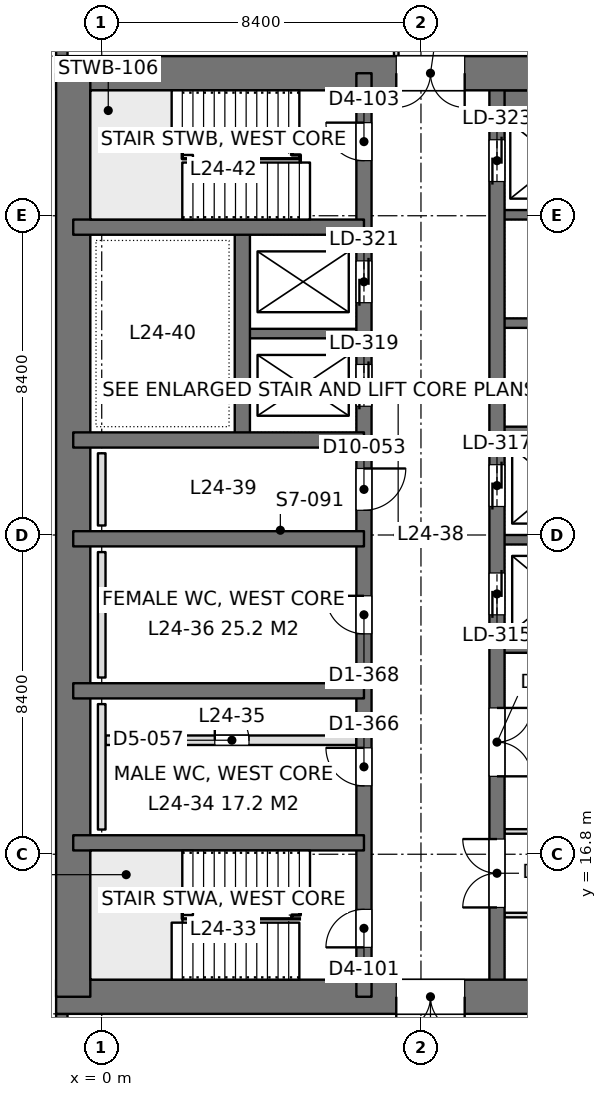
"""IFC4 building model, lengths in metres.
Left out: names, types, materials, properties, quantities, classifications, styles, units other than length and angle.
Written with IfcOpenShell. Run it as: python <this file> out.ifc"""

import sys

from ifc_helpers import new_model, si_unit, direction, frame, frame_2d, origin, place, context, subcontext, project, spatial, rectangle, extrude, element, fill, save


model = new_model("IFC4")
c1 = context("Model", 3, precision=1e-05, world=origin(), true_north=direction((0.0, 1.0)))
c2 = subcontext(c1, "Body", "Model", "MODEL_VIEW")
j1 = project(units=[si_unit("LENGTHUNIT", "METRE"), si_unit("PLANEANGLEUNIT", "RADIAN")], contexts=[c1])
p1 = place(None, origin())
s1 = spatial("IfcSite", under=j1, at=p1, CompositionType="ELEMENT")
p2 = place(p1, origin())
s2 = spatial("IfcBuilding", under=s1, at=p2, CompositionType="ELEMENT")
p3 = place(p2, frame((0.0, 0.0, 109.2)))
s3 = spatial("IfcBuildingStorey", under=s2, at=p3, CompositionType="ELEMENT", Elevation=109.2)
p4 = place(p3, frame((-1.2, 13.05, 0.0), z_axis=(0.0, 0.0, 1.0), x_axis=(1.0, 0.0, 0.0)))
e1 = element("IfcWall", 1, at=p4, inside=s3, PredefinedType="SHEAR", context=c2, shape_type="SweptSolid", body=[
    extrude(rectangle(XDim=18.0, YDim=0.9, at=frame_2d((9.0, 0.0))), origin(), (0.0, 0.0, 1.0), 4.2),
])
p5 = place(p4, frame((8.95, 0.0, 0.0)))
e2 = element("IfcOpeningElement", 2, at=p5, cuts=e1, PredefinedType="OPENING", context=c2, shape_type="SweptSolid", body=[
    extrude(rectangle(XDim=1.8, YDim=2.4, at=frame_2d((0.9, 1.2))), frame((0.0, 0.46, 0.0), z_axis=(0.0, -1.0, 0.0), x_axis=(1.0, 0.0, 0.0)), (0.0, 0.0, 1.0), 0.92),
])
p6 = place(p3, frame((-1.2, 37.35, 0.0), z_axis=(0.0, 0.0, 1.0), x_axis=(1.0, 0.0, 0.0)))
e3 = element("IfcWall", 3, at=p6, inside=s3, PredefinedType="SHEAR", context=c2, shape_type="SweptSolid", body=[
    extrude(rectangle(XDim=18.0, YDim=0.9, at=frame_2d((9.0, 0.0))), origin(), (0.0, 0.0, 1.0), 4.2),
])
p7 = place(p6, frame((8.95, 0.0, 0.0)))
e4 = element("IfcOpeningElement", 4, at=p7, cuts=e3, PredefinedType="OPENING", context=c2, shape_type="SweptSolid", body=[
    extrude(rectangle(XDim=1.8, YDim=2.4, at=frame_2d((0.9, 1.2))), frame((0.0, 0.46, 0.0), z_axis=(0.0, -1.0, 0.0), x_axis=(1.0, 0.0, 0.0)), (0.0, 0.0, 1.0), 0.92),
])
p8 = place(p3, frame((-0.75, 13.05, 0.0), z_axis=(0.0, 0.0, 1.0), x_axis=(0.0, 1.0, 0.0)))
e5 = element("IfcWall", 5, at=p8, inside=s3, PredefinedType="SHEAR", context=c2, shape_type="SweptSolid", body=[
    extrude(rectangle(XDim=24.3, YDim=0.9, at=frame_2d((12.15, 0.0))), origin(), (0.0, 0.0, 1.0), 4.2),
])
p9 = place(p3, frame((6.9, 13.05, 0.0), z_axis=(0.0, 0.0, 1.0), x_axis=(0.0, 1.0, 0.0)))
e6 = element("IfcWall", 6, at=p9, inside=s3, PredefinedType="SHEAR", context=c2, shape_type="SweptSolid", body=[
    extrude(rectangle(XDim=24.3, YDim=0.4, at=frame_2d((12.15, 0.0))), origin(), (0.0, 0.0, 1.0), 4.2),
])
p10 = place(p9, frame((1.3, 0.0, 0.0)))
e7 = element("IfcOpeningElement", 7, at=p10, cuts=e6, PredefinedType="OPENING", context=c2, shape_type="SweptSolid", body=[
    extrude(rectangle(XDim=1.0, YDim=2.2, at=frame_2d((0.5, 1.1))), frame((0.0, 0.21, 0.0), z_axis=(0.0, -1.0, 0.0), x_axis=(1.0, 0.0, 0.0)), (0.0, 0.0, 1.0), 0.42),
])
p11 = place(p9, frame((22.0, 0.0, 0.0)))
e8 = element("IfcOpeningElement", 8, at=p11, cuts=e6, PredefinedType="OPENING", context=c2, shape_type="SweptSolid", body=[
    extrude(rectangle(XDim=1.0, YDim=2.2, at=frame_2d((0.5, 1.1))), frame((0.0, 0.21, 0.0), z_axis=(0.0, -1.0, 0.0), x_axis=(1.0, 0.0, 0.0)), (0.0, 0.0, 1.0), 0.42),
])
p12 = place(p9, frame((5.55, 0.0, 0.0)))
e9 = element("IfcOpeningElement", 9, at=p12, cuts=e6, PredefinedType="OPENING", context=c2, shape_type="SweptSolid", body=[
    extrude(rectangle(XDim=1.0, YDim=2.2, at=frame_2d((0.5, 1.1))), frame((0.0, 0.21, 0.0), z_axis=(0.0, -1.0, 0.0), x_axis=(1.0, 0.0, 0.0)), (0.0, 0.0, 1.0), 0.42),
])
p13 = place(p9, frame((9.55, 0.0, 0.0)))
e10 = element("IfcOpeningElement", 10, at=p13, cuts=e6, PredefinedType="OPENING", context=c2, shape_type="SweptSolid", body=[
    extrude(rectangle(XDim=1.0, YDim=2.2, at=frame_2d((0.5, 1.1))), frame((0.0, 0.21, 0.0), z_axis=(0.0, -1.0, 0.0), x_axis=(1.0, 0.0, 0.0)), (0.0, 0.0, 1.0), 0.42),
])
p14 = place(p9, frame((12.8, 0.0, 0.0)))
e11 = element("IfcOpeningElement", 11, at=p14, cuts=e6, PredefinedType="OPENING", context=c2, shape_type="SweptSolid", body=[
    extrude(rectangle(XDim=1.1, YDim=2.2, at=frame_2d((0.55, 1.1))), frame((0.0, 0.21, 0.0), z_axis=(0.0, -1.0, 0.0), x_axis=(1.0, 0.0, 0.0)), (0.0, 0.0, 1.0), 0.42),
])
p15 = place(p9, frame((15.538, 0.0, 0.0)))
e12 = element("IfcOpeningElement", 12, at=p15, cuts=e6, PredefinedType="OPENING", context=c2, shape_type="SweptSolid", body=[
    extrude(rectangle(XDim=1.1, YDim=2.2, at=frame_2d((0.55, 1.1))), frame((0.0, 0.21, 0.0), z_axis=(0.0, -1.0, 0.0), x_axis=(1.0, 0.0, 0.0)), (0.0, 0.0, 1.0), 0.42),
])
p16 = place(p9, frame((18.262, 0.0, 0.0)))
e13 = element("IfcOpeningElement", 13, at=p16, cuts=e6, PredefinedType="OPENING", context=c2, shape_type="SweptSolid", body=[
    extrude(rectangle(XDim=1.1, YDim=2.2, at=frame_2d((0.55, 1.1))), frame((0.0, 0.21, 0.0), z_axis=(0.0, -1.0, 0.0), x_axis=(1.0, 0.0, 0.0)), (0.0, 0.0, 1.0), 0.42),
])
p17 = place(p3, frame((10.4, 13.05, 0.0), z_axis=(0.0, 0.0, 1.0), x_axis=(0.0, 1.0, 0.0)))
e14 = element("IfcWall", 14, at=p17, inside=s3, PredefinedType="SHEAR", context=c2, shape_type="SweptSolid", body=[
    extrude(rectangle(XDim=24.3, YDim=0.4, at=frame_2d((12.15, 0.0))), origin(), (0.0, 0.0, 1.0), 4.2),
])
p18 = place(p17, frame((10.05, 0.0, 0.0)))
e15 = element("IfcOpeningElement", 15, at=p18, cuts=e14, PredefinedType="OPENING", context=c2, shape_type="SweptSolid", body=[
    extrude(rectangle(XDim=1.1, YDim=2.2, at=frame_2d((0.55, 1.1))), frame((0.0, 0.21, 0.0), z_axis=(0.0, -1.0, 0.0), x_axis=(1.0, 0.0, 0.0)), (0.0, 0.0, 1.0), 0.42),
])
p19 = place(p17, frame((12.9, 0.0, 0.0)))
e16 = element("IfcOpeningElement", 16, at=p19, cuts=e14, PredefinedType="OPENING", context=c2, shape_type="SweptSolid", body=[
    extrude(rectangle(XDim=1.1, YDim=2.2, at=frame_2d((0.55, 1.1))), frame((0.0, 0.21, 0.0), z_axis=(0.0, -1.0, 0.0), x_axis=(1.0, 0.0, 0.0)), (0.0, 0.0, 1.0), 0.42),
])
p20 = place(p17, frame((21.45, 0.0, 0.0)))
e17 = element("IfcOpeningElement", 17, at=p20, cuts=e14, PredefinedType="OPENING", context=c2, shape_type="SweptSolid", body=[
    extrude(rectangle(XDim=1.1, YDim=2.2, at=frame_2d((0.55, 1.1))), frame((0.0, 0.21, 0.0), z_axis=(0.0, -1.0, 0.0), x_axis=(1.0, 0.0, 0.0)), (0.0, 0.0, 1.0), 0.42),
])
p21 = place(p17, frame((2.35, 0.0, 0.0)))
e18 = element("IfcOpeningElement", 18, at=p21, cuts=e14, PredefinedType="OPENING", context=c2, shape_type="SweptSolid", body=[
    extrude(rectangle(XDim=1.8, YDim=2.4, at=frame_2d((0.9, 1.2))), frame((0.0, 0.21, 0.0), z_axis=(0.0, -1.0, 0.0), x_axis=(1.0, 0.0, 0.0)), (0.0, 0.0, 1.0), 0.42),
])
p22 = place(p17, frame((5.8, 0.0, 0.0)))
e19 = element("IfcOpeningElement", 19, at=p22, cuts=e14, PredefinedType="OPENING", context=c2, shape_type="SweptSolid", body=[
    extrude(rectangle(XDim=1.8, YDim=2.4, at=frame_2d((0.9, 1.2))), frame((0.0, 0.21, 0.0), z_axis=(0.0, -1.0, 0.0), x_axis=(1.0, 0.0, 0.0)), (0.0, 0.0, 1.0), 0.42),
])
for number, where, z_axis, x_axis in (
    (20, (-0.75, 17.1, 0.0), (0.0, 0.0, 1.0), (1.0, 0.0, 0.0)),
    (21, (-0.75, 21.1, 0.0), (0.0, 0.0, 1.0), (1.0, 0.0, 0.0)),
    (22, (-0.75, 25.1, 0.0), (0.0, 0.0, 1.0), (1.0, 0.0, 0.0)),
    (23, (-0.75, 27.7, 0.0), (0.0, 0.0, 1.0), (1.0, 0.0, 0.0)),
    (24, (-0.75, 33.3, 0.0), (0.0, 0.0, 1.0), (1.0, 0.0, 0.0)),
):
    element("IfcWall", number, at=place(p3, frame(where, z_axis=z_axis, x_axis=x_axis)), inside=s3, PredefinedType="SHEAR", context=c2, shape_type="SweptSolid", body=[
        extrude(rectangle(XDim=7.65, YDim=0.4, at=frame_2d((3.825, 0.0))), origin(), (0.0, 0.0, 1.0), 4.2),
    ])
p23 = place(p3, frame((3.7, 27.7, 0.0), z_axis=(0.0, 0.0, 1.0), x_axis=(0.0, 1.0, 0.0)))
e25 = element("IfcWall", 25, at=p23, inside=s3, PredefinedType="SHEAR", context=c2, shape_type="SweptSolid", body=[
    extrude(rectangle(XDim=5.6, YDim=0.4, at=frame_2d((2.8, 0.0))), origin(), (0.0, 0.0, 1.0), 4.2),
])
p24 = place(p3, frame((3.7, 30.5, 0.0), z_axis=(0.0, 0.0, 1.0), x_axis=(1.0, 0.0, 0.0)))
e26 = element("IfcWall", 26, at=p24, inside=s3, PredefinedType="SHEAR", context=c2, shape_type="SweptSolid", body=[
    extrude(rectangle(XDim=3.2, YDim=0.25, at=frame_2d((1.6, 0.0))), origin(), (0.0, 0.0, 1.0), 4.2),
])
p25 = place(p3, frame((10.4, 22.225, 0.0), z_axis=(0.0, 0.0, 1.0), x_axis=(1.0, 0.0, 0.0)))
e27 = element("IfcWall", 27, at=p25, inside=s3, PredefinedType="SHEAR", context=c2, shape_type="SweptSolid", body=[
    extrude(rectangle(XDim=5.95, YDim=0.25, at=frame_2d((2.975, 0.0))), origin(), (0.0, 0.0, 1.0), 4.2),
])
for number, where, z_axis, x_axis in (
    (28, (10.4, 25.075, 0.0), (0.0, 0.0, 1.0), (1.0, 0.0, 0.0)),
    (29, (10.4, 27.925, 0.0), (0.0, 0.0, 1.0), (1.0, 0.0, 0.0)),
    (30, (10.4, 30.775, 0.0), (0.0, 0.0, 1.0), (1.0, 0.0, 0.0)),
    (31, (10.4, 33.625, 0.0), (0.0, 0.0, 1.0), (1.0, 0.0, 0.0)),
):
    element("IfcWall", number, at=place(p3, frame(where, z_axis=z_axis, x_axis=x_axis)), inside=s3, PredefinedType="SHEAR", context=c2, shape_type="SweptSolid", body=[
        extrude(rectangle(XDim=3.2, YDim=0.25, at=frame_2d((1.6, 0.0))), origin(), (0.0, 0.0, 1.0), 4.2),
    ])
p26 = place(p3, frame((10.4, 36.625, 0.0), z_axis=(0.0, 0.0, 1.0), x_axis=(1.0, 0.0, 0.0)))
e32 = element("IfcWall", 32, at=p26, inside=s3, PredefinedType="SHEAR", context=c2, shape_type="SweptSolid", body=[
    extrude(rectangle(XDim=3.2, YDim=0.55, at=frame_2d((1.6, 0.0))), origin(), (0.0, 0.0, 1.0), 4.2),
])
p27 = place(p3, frame((-1.05, 8.4, 0.0), z_axis=(0.0, 0.0, 1.0), x_axis=(0.0, 1.0, 0.0)))
e33 = element("IfcWall", 33, at=p27, inside=s3, PredefinedType="SOLIDWALL", context=c2, shape_type="SweptSolid", body=[
    extrude(rectangle(XDim=4.2, YDim=0.3, at=frame_2d((2.1, 0.0))), origin(), (0.0, 0.0, 1.0), 4.05),
])
p28 = place(p27, frame((0.9, 0.0, 0.9)))
e34 = element("IfcOpeningElement", 34, at=p28, cuts=e33, PredefinedType="OPENING", context=c2, shape_type="SweptSolid", body=[
    extrude(rectangle(XDim=2.4, YDim=1.9, at=frame_2d((1.2, 0.95))), frame((0.0, 0.16, 0.0), z_axis=(0.0, -1.0, 0.0), x_axis=(1.0, 0.0, 0.0)), (0.0, 0.0, 1.0), 0.32),
])
p29 = place(p3, frame((-1.05, 37.8, 0.0), z_axis=(0.0, 0.0, 1.0), x_axis=(0.0, 1.0, 0.0)))
e35 = element("IfcWall", 35, at=p29, inside=s3, PredefinedType="SOLIDWALL", context=c2, shape_type="SweptSolid", body=[
    extrude(rectangle(XDim=4.2, YDim=0.3, at=frame_2d((2.1, 0.0))), origin(), (0.0, 0.0, 1.0), 4.05),
])
p30 = place(p29, frame((0.9, 0.0, 0.9)))
e36 = element("IfcOpeningElement", 36, at=p30, cuts=e35, PredefinedType="OPENING", context=c2, shape_type="SweptSolid", body=[
    extrude(rectangle(XDim=2.4, YDim=1.9, at=frame_2d((1.2, 0.95))), frame((0.0, 0.16, 0.0), z_axis=(0.0, -1.0, 0.0), x_axis=(1.0, 0.0, 0.0)), (0.0, 0.0, 1.0), 0.32),
])
p31 = place(p3, frame((10.598, 17.4, 0.0), z_axis=(0.0, 0.0, 1.0), x_axis=(1.0, 0.0, 0.0)))
e37 = element("IfcWall", 37, at=p31, inside=s3, PredefinedType="PARTITIONING", context=c2, shape_type="SweptSolid", body=[
    extrude(rectangle(XDim=5.904, YDim=0.12, at=frame_2d((2.952, 0.0))), origin(), (0.0, 0.0, 1.0), 3.55),
])
p32 = place(p31, frame((4.524, 0.0, 0.0)))
e38 = element("IfcOpeningElement", 38, at=p32, cuts=e37, PredefinedType="OPENING", context=c2, shape_type="SweptSolid", body=[
    extrude(rectangle(XDim=1.0, YDim=2.4, at=frame_2d((0.5, 1.2))), frame((0.0, 0.07, 0.0), z_axis=(0.0, -1.0, 0.0), x_axis=(1.0, 0.0, 0.0)), (0.0, 0.0, 1.0), 0.14),
])
p33 = place(p3, frame((10.598, 15.2, 0.0), z_axis=(0.0, 0.0, 1.0), x_axis=(1.0, 0.0, 0.0)))
e39 = element("IfcWall", 39, at=p33, inside=s3, PredefinedType="PARTITIONING", context=c2, shape_type="SweptSolid", body=[
    extrude(rectangle(XDim=6.204, YDim=0.12, at=frame_2d((3.102, 0.0))), origin(), (0.0, 0.0, 1.0), 3.55),
])
p34 = place(p3, frame((7.75, 37.8, 0.0), z_axis=(0.0, 0.0, 1.0), x_axis=(0.0, 1.0, 0.0)))
e40 = element("IfcWall", 40, at=p34, inside=s3, PredefinedType="PARTITIONING", context=c2, shape_type="SweptSolid", body=[
    extrude(rectangle(XDim=2.0, YDim=0.12, at=frame_2d((1.0, 0.0))), origin(), (0.0, 0.0, 1.0), 4.05),
])
p35 = place(p3, frame((0.1, 19.8, 0.0), z_axis=(0.0, 0.0, 1.0), x_axis=(1.0, 0.0, 0.0)))
e41 = element("IfcWall", 41, at=p35, inside=s3, PredefinedType="PARTITIONING", context=c2, shape_type="SweptSolid", body=[
    extrude(rectangle(XDim=6.6, YDim=0.25, at=frame_2d((3.3, 0.0))), origin(), (0.0, 0.0, 1.0), 4.0),
])
p36 = place(p35, frame((2.875, 0.0, 0.0)))
e42 = element("IfcOpeningElement", 42, at=p36, cuts=e41, PredefinedType="OPENING", context=c2, shape_type="SweptSolid", body=[
    extrude(rectangle(XDim=0.9, YDim=2.2, at=frame_2d((0.45, 1.1))), frame((0.0, 0.135, 0.0), z_axis=(0.0, -1.0, 0.0), x_axis=(1.0, 0.0, 0.0)), (0.0, 0.0, 1.0), 0.27),
])
for number, where, z_axis, x_axis in (
    (43, (0.0, 17.45, 0.0), (0.0, 0.0, 1.0), (0.0, 1.0, 0.0)),
    (44, (0.0, 21.45, 0.0), (0.0, 0.0, 1.0), (0.0, 1.0, 0.0)),
):
    element("IfcWall", number, at=place(p3, frame(where, z_axis=z_axis, x_axis=x_axis)), inside=s3, PredefinedType="PLUMBINGWALL", context=c2, shape_type="SweptSolid", body=[
        extrude(rectangle(XDim=3.3, YDim=0.2, at=frame_2d((1.65, 0.0))), origin(), (0.0, 0.0, 1.0), 1.2),
    ])
p37 = place(p3, frame((0.0, 25.45, 0.0), z_axis=(0.0, 0.0, 1.0), x_axis=(0.0, 1.0, 0.0)))
e45 = element("IfcWall", 45, at=p37, inside=s3, PredefinedType="PLUMBINGWALL", context=c2, shape_type="SweptSolid", body=[
    extrude(rectangle(XDim=1.9, YDim=0.2, at=frame_2d((0.95, 0.0))), origin(), (0.0, 0.0, 1.0), 1.2),
])
p38 = place(p5, frame((1.8, 0.0, 0.0), z_axis=(0.0, 0.0, 1.0), x_axis=(-1.0, 0.0, 0.0)))
e46 = element("IfcDoor", 46, at=p38, inside=s3, OperationType="DOUBLE_DOOR_SINGLE_SWING", PredefinedType="DOOR", context=c2, shape_type="SweptSolid", body=[
    extrude(rectangle(XDim=1.8, YDim=2.4, at=frame_2d((0.9, 1.2))), frame((0.0, 0.025, 0.0), z_axis=(0.0, -1.0, 0.0), x_axis=(1.0, 0.0, 0.0)), (0.0, 0.0, 1.0), 0.05),
])
fill(e2, e46)
p39 = place(p7, frame((1.8, 0.0, 0.0), z_axis=(0.0, 0.0, 1.0), x_axis=(-1.0, 0.0, 0.0)))
e47 = element("IfcDoor", 47, at=p39, inside=s3, OperationType="DOUBLE_DOOR_SINGLE_SWING", PredefinedType="DOOR", context=c2, shape_type="SweptSolid", body=[
    extrude(rectangle(XDim=1.8, YDim=2.4, at=frame_2d((0.9, 1.2))), frame((0.0, 0.025, 0.0), z_axis=(0.0, -1.0, 0.0), x_axis=(1.0, 0.0, 0.0)), (0.0, 0.0, 1.0), 0.05),
])
fill(e4, e47)
p40 = place(p10, origin())
e48 = element("IfcDoor", 48, at=p40, inside=s3, OperationType="SINGLE_SWING_LEFT", PredefinedType="DOOR", context=c2, shape_type="SweptSolid", body=[
    extrude(rectangle(XDim=1.0, YDim=2.2, at=frame_2d((0.5, 1.1))), frame((0.0, 0.025, 0.0), z_axis=(0.0, -1.0, 0.0), x_axis=(1.0, 0.0, 0.0)), (0.0, 0.0, 1.0), 0.05),
])
fill(e7, e48)
p41 = place(p11, origin())
e49 = element("IfcDoor", 49, at=p41, inside=s3, OperationType="SINGLE_SWING_RIGHT", PredefinedType="DOOR", context=c2, shape_type="SweptSolid", body=[
    extrude(rectangle(XDim=1.0, YDim=2.2, at=frame_2d((0.5, 1.1))), frame((0.0, 0.025, 0.0), z_axis=(0.0, -1.0, 0.0), x_axis=(1.0, 0.0, 0.0)), (0.0, 0.0, 1.0), 0.05),
])
fill(e8, e49)
p42 = place(p12, origin())
e50 = element("IfcDoor", 50, at=p42, inside=s3, OperationType="SINGLE_SWING_RIGHT", PredefinedType="DOOR", context=c2, shape_type="SweptSolid", body=[
    extrude(rectangle(XDim=1.0, YDim=2.2, at=frame_2d((0.5, 1.1))), frame((0.0, 0.025, 0.0), z_axis=(0.0, -1.0, 0.0), x_axis=(1.0, 0.0, 0.0)), (0.0, 0.0, 1.0), 0.05),
])
fill(e9, e50)
p43 = place(p13, origin())
e51 = element("IfcDoor", 51, at=p43, inside=s3, OperationType="SINGLE_SWING_RIGHT", PredefinedType="DOOR", context=c2, shape_type="SweptSolid", body=[
    extrude(rectangle(XDim=1.0, YDim=2.2, at=frame_2d((0.5, 1.1))), frame((0.0, 0.025, 0.0), z_axis=(0.0, -1.0, 0.0), x_axis=(1.0, 0.0, 0.0)), (0.0, 0.0, 1.0), 0.05),
])
fill(e10, e51)
p44 = place(p14, frame((1.1, 0.0, 0.0), z_axis=(0.0, 0.0, 1.0), x_axis=(-1.0, 0.0, 0.0)))
e52 = element("IfcDoor", 52, at=p44, inside=s3, OperationType="SINGLE_SWING_LEFT", PredefinedType="DOOR", context=c2, shape_type="SweptSolid", body=[
    extrude(rectangle(XDim=1.1, YDim=2.2, at=frame_2d((0.55, 1.1))), frame((0.0, 0.025, 0.0), z_axis=(0.0, -1.0, 0.0), x_axis=(1.0, 0.0, 0.0)), (0.0, 0.0, 1.0), 0.05),
])
fill(e11, e52)
p45 = place(p18, origin())
e53 = element("IfcDoor", 53, at=p45, inside=s3, OperationType="DOUBLE_DOOR_SLIDING", PredefinedType="DOOR", context=c2, shape_type="SweptSolid", body=[
    extrude(rectangle(XDim=1.1, YDim=2.2, at=frame_2d((0.55, 1.1))), frame((0.0, 0.025, 0.0), z_axis=(0.0, -1.0, 0.0), x_axis=(1.0, 0.0, 0.0)), (0.0, 0.0, 1.0), 0.05),
])
fill(e15, e53)
p46 = place(p19, origin())
e54 = element("IfcDoor", 54, at=p46, inside=s3, OperationType="DOUBLE_DOOR_SLIDING", PredefinedType="DOOR", context=c2, shape_type="SweptSolid", body=[
    extrude(rectangle(XDim=1.1, YDim=2.2, at=frame_2d((0.55, 1.1))), frame((0.0, 0.025, 0.0), z_axis=(0.0, -1.0, 0.0), x_axis=(1.0, 0.0, 0.0)), (0.0, 0.0, 1.0), 0.05),
])
fill(e16, e54)
p47 = place(p20, origin())
e55 = element("IfcDoor", 55, at=p47, inside=s3, OperationType="DOUBLE_DOOR_SLIDING", PredefinedType="DOOR", context=c2, shape_type="SweptSolid", body=[
    extrude(rectangle(XDim=1.1, YDim=2.2, at=frame_2d((0.55, 1.1))), frame((0.0, 0.025, 0.0), z_axis=(0.0, -1.0, 0.0), x_axis=(1.0, 0.0, 0.0)), (0.0, 0.0, 1.0), 0.05),
])
fill(e17, e55)
p48 = place(p15, origin())
e56 = element("IfcDoor", 56, at=p48, inside=s3, OperationType="DOUBLE_DOOR_SLIDING", PredefinedType="DOOR", context=c2, shape_type="SweptSolid", body=[
    extrude(rectangle(XDim=1.1, YDim=2.2, at=frame_2d((0.55, 1.1))), frame((0.0, 0.025, 0.0), z_axis=(0.0, -1.0, 0.0), x_axis=(1.0, 0.0, 0.0)), (0.0, 0.0, 1.0), 0.05),
])
fill(e12, e56)
p49 = place(p16, origin())
e57 = element("IfcDoor", 57, at=p49, inside=s3, OperationType="DOUBLE_DOOR_SLIDING", PredefinedType="DOOR", context=c2, shape_type="SweptSolid", body=[
    extrude(rectangle(XDim=1.1, YDim=2.2, at=frame_2d((0.55, 1.1))), frame((0.0, 0.025, 0.0), z_axis=(0.0, -1.0, 0.0), x_axis=(1.0, 0.0, 0.0)), (0.0, 0.0, 1.0), 0.05),
])
fill(e13, e57)
p50 = place(p21, origin())
e58 = element("IfcDoor", 58, at=p50, inside=s3, OperationType="DOUBLE_DOOR_SINGLE_SWING", PredefinedType="DOOR", context=c2, shape_type="SweptSolid", body=[
    extrude(rectangle(XDim=1.8, YDim=2.4, at=frame_2d((0.9, 1.2))), frame((0.0, 0.025, 0.0), z_axis=(0.0, -1.0, 0.0), x_axis=(1.0, 0.0, 0.0)), (0.0, 0.0, 1.0), 0.05),
])
fill(e18, e58)
p51 = place(p22, frame((1.8, 0.0, 0.0), z_axis=(0.0, 0.0, 1.0), x_axis=(-1.0, 0.0, 0.0)))
e59 = element("IfcDoor", 59, at=p51, inside=s3, OperationType="DOUBLE_DOOR_SINGLE_SWING", PredefinedType="DOOR", context=c2, shape_type="SweptSolid", body=[
    extrude(rectangle(XDim=1.8, YDim=2.4, at=frame_2d((0.9, 1.2))), frame((0.0, 0.025, 0.0), z_axis=(0.0, -1.0, 0.0), x_axis=(1.0, 0.0, 0.0)), (0.0, 0.0, 1.0), 0.05),
])
fill(e19, e59)
p52 = place(p36, origin())
e60 = element("IfcDoor", 60, at=p52, inside=s3, OperationType="SINGLE_SWING_LEFT", PredefinedType="DOOR", context=c2, shape_type="SweptSolid", body=[
    extrude(rectangle(XDim=0.9, YDim=2.2, at=frame_2d((0.45, 1.1))), frame((0.0, 0.025, 0.0), z_axis=(0.0, -1.0, 0.0), x_axis=(1.0, 0.0, 0.0)), (0.0, 0.0, 1.0), 0.05),
])
fill(e42, e60)
save(model, sys.argv[1])
